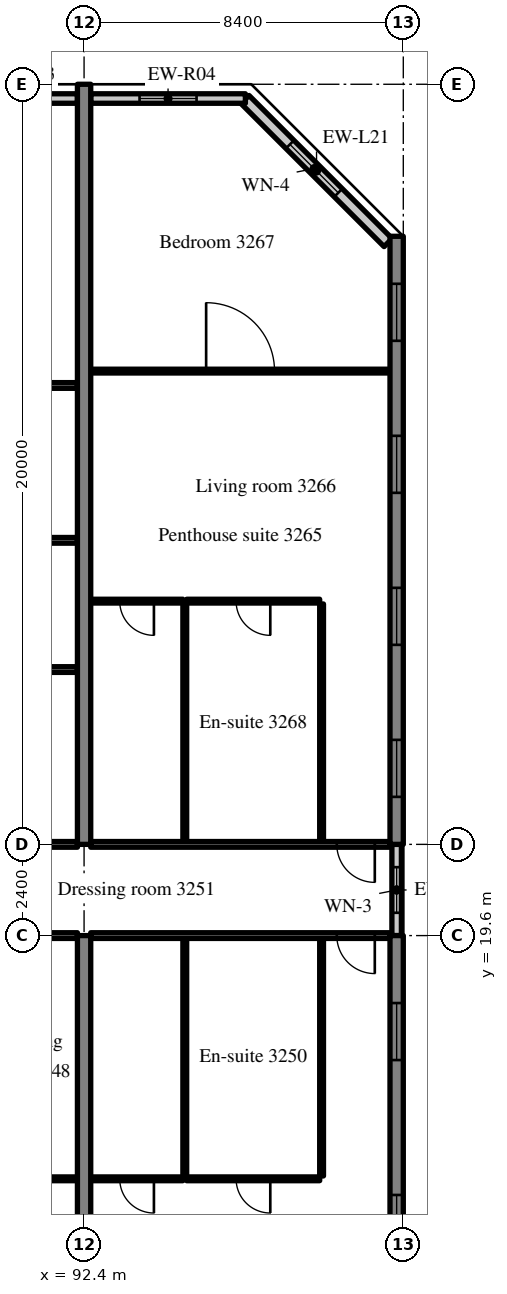
"""IFC4 building model, lengths in metres.
Left out: names, types, materials, properties, quantities, classifications, styles, units other than length and angle.
Written with IfcOpenShell. Run it as: python <this file> out.ifc"""

import sys

from ifc_helpers import new_model, si_unit, direction, frame, frame_2d, origin, place, context, subcontext, project, spatial, rectangle, extrude, source, transform, mapped, element, fill, save


model = new_model("IFC4")
c1 = context("Model", 3, precision=1e-05, world=origin(), true_north=direction((0.0, 1.0)))
c2 = subcontext(c1, "Body", "Model", "MODEL_VIEW")
j1 = project(units=[si_unit("LENGTHUNIT", "METRE"), si_unit("PLANEANGLEUNIT", "RADIAN")], contexts=[c1])
p1 = place(None, origin())
s1 = spatial("IfcSite", under=j1, at=p1, CompositionType="ELEMENT")
p2 = place(p1, origin())
s2 = spatial("IfcBuilding", under=s1, at=p2, CompositionType="ELEMENT")
p3 = place(p2, frame((0.0, 0.0, 133.2)))
s3 = spatial("IfcBuildingStorey", under=s2, at=p3, CompositionType="ELEMENT", Elevation=133.2)
m1 = source(origin(), c2, "Body", "SweptSolid", [
    extrude(rectangle(XDim=14.1, YDim=0.35, at=frame_2d((7.05, 0.0))), origin(), (0.0, 0.0, 1.0), 3.52),
])
p4 = place(p3, frame((92.4, 5.5, 0.0), z_axis=(0.0, 0.0, 1.0), x_axis=(0.0, 1.0, 0.0)))
e1 = element("IfcWall", 1, at=p4, inside=s3, PredefinedType="SHEAR", context=c2, shape_type="MappedRepresentation", body=[
    mapped(m1, transform((0.0, 0.0, 0.0), scale=1.0)),
])
m2 = source(origin(), c2, "Body", "SweptSolid", [
    extrude(rectangle(XDim=20.0, YDim=0.35, at=frame_2d((10.0, 0.0))), origin(), (0.0, 0.0, 1.0), 3.52),
])
p5 = place(p3, frame((92.4, 22.0, 0.0), z_axis=(0.0, 0.0, 1.0), x_axis=(0.0, 1.0, 0.0)))
e2 = element("IfcWall", 2, at=p5, inside=s3, PredefinedType="SHEAR", context=c2, shape_type="MappedRepresentation", body=[
    mapped(m2, transform((0.0, 0.0, 0.0), scale=1.0)),
])
m3 = source(origin(), c2, "Body", "SweptSolid", [
    extrude(rectangle(XDim=10.1, YDim=0.35, at=frame_2d((5.05, 0.0))), origin(), (0.0, 0.0, 1.0), 3.52),
])
p6 = place(p3, frame((100.625, 9.5, 0.0), z_axis=(0.0, 0.0, 1.0), x_axis=(0.0, 1.0, 0.0)))
e3 = element("IfcWall", 3, at=p6, inside=s3, PredefinedType="SHEAR", context=c2, shape_type="MappedRepresentation", body=[
    mapped(m3, transform((0.0, 0.0, 0.0), scale=1.0)),
])
m4 = source(origin(), c2, "Body", "SweptSolid", [
    extrude(rectangle(XDim=1.5, YDim=1.5, at=frame_2d((0.75, 0.75))), frame((0.0, 0.185, 0.0), z_axis=(0.0, -1.0, 0.0), x_axis=(1.0, 0.0, 0.0)), (0.0, 0.0, 1.0), 0.37),
])
p7 = place(p6, frame((1.775, 0.0, 0.9)))
e4 = element("IfcOpeningElement", 4, at=p7, cuts=e3, PredefinedType="OPENING", context=c2, shape_type="MappedRepresentation", body=[
    mapped(m4, transform((0.0, 0.0, 0.0), scale=1.0)),
])
p8 = place(p6, frame((6.825, 0.0, 0.9)))
e5 = element("IfcOpeningElement", 5, at=p8, cuts=e3, PredefinedType="OPENING", context=c2, shape_type="MappedRepresentation", body=[
    mapped(m4, transform((0.0, 0.0, 0.0), scale=1.0)),
])
m5 = source(origin(), c2, "Body", "SweptSolid", [
    extrude(rectangle(XDim=16.0, YDim=0.35, at=frame_2d((8.0, 0.0))), origin(), (0.0, 0.0, 1.0), 3.52),
])
p9 = place(p3, frame((100.625, 22.0, 0.0), z_axis=(0.0, 0.0, 1.0), x_axis=(0.0, 1.0, 0.0)))
e6 = element("IfcWall", 6, at=p9, inside=s3, PredefinedType="SHEAR", context=c2, shape_type="MappedRepresentation", body=[
    mapped(m5, transform((0.0, 0.0, 0.0), scale=1.0)),
])
p10 = place(p9, frame((1.25, 0.0, 0.9)))
e7 = element("IfcOpeningElement", 7, at=p10, cuts=e6, PredefinedType="OPENING", context=c2, shape_type="MappedRepresentation", body=[
    mapped(m4, transform((0.0, 0.0, 0.0), scale=1.0)),
])
p11 = place(p9, frame((5.25, 0.0, 0.9)))
e8 = element("IfcOpeningElement", 8, at=p11, cuts=e6, PredefinedType="OPENING", context=c2, shape_type="MappedRepresentation", body=[
    mapped(m4, transform((0.0, 0.0, 0.0), scale=1.0)),
])
p12 = place(p9, frame((9.25, 0.0, 0.9)))
e9 = element("IfcOpeningElement", 9, at=p12, cuts=e6, PredefinedType="OPENING", context=c2, shape_type="MappedRepresentation", body=[
    mapped(m4, transform((0.0, 0.0, 0.0), scale=1.0)),
])
p13 = place(p9, frame((13.25, 0.0, 0.9)))
e10 = element("IfcOpeningElement", 10, at=p13, cuts=e6, PredefinedType="OPENING", context=c2, shape_type="MappedRepresentation", body=[
    mapped(m4, transform((0.0, 0.0, 0.0), scale=1.0)),
])
m6 = source(origin(), c2, "Body", "SweptSolid", [
    extrude(rectangle(XDim=5.326, YDim=0.3, at=frame_2d((2.663, 0.0))), origin(), (0.0, 0.0, 1.0), 3.52),
])
p14 = place(p3, frame((100.4, 37.834, 0.0), z_axis=(0.0, 0.0, 1.0), x_axis=(-0.707083859269, 0.707129702361, 0.0)))
e11 = element("IfcWall", 11, at=p14, inside=s3, PredefinedType="SOLIDWALL", context=c2, shape_type="MappedRepresentation", body=[
    mapped(m6, transform((0.0, 0.0, 0.0), scale=1.0)),
])
m7 = source(origin(), c2, "Body", "SweptSolid", [
    extrude(rectangle(XDim=1.8, YDim=1.5, at=frame_2d((0.9, 0.75))), frame((0.0, 0.16, 0.0), z_axis=(0.0, -1.0, 0.0), x_axis=(1.0, 0.0, 0.0)), (0.0, 0.0, 1.0), 0.32),
])
p15 = place(p14, frame((1.854, 0.0, 0.9)))
e12 = element("IfcOpeningElement", 12, at=p15, cuts=e11, PredefinedType="OPENING", context=c2, shape_type="MappedRepresentation", body=[
    mapped(m7, transform((0.0, 0.0, 0.0), scale=1.0)),
])
m8 = source(origin(), c2, "Body", "SweptSolid", [
    extrude(rectangle(XDim=3.675, YDim=0.25, at=frame_2d((1.837, 0.0))), origin(), (0.0, 0.0, 1.0), 2.82),
])
p16 = place(p3, frame((92.225, 41.625, 0.0), z_axis=(0.0, 0.0, 1.0), x_axis=(-1.0, 0.0, 0.0)))
e13 = element("IfcWall", 13, at=p16, inside=s3, PredefinedType="SOLIDWALL", context=c2, shape_type="MappedRepresentation", body=[
    mapped(m8, transform((0.0, 0.0, 0.0), scale=1.0)),
])
m9 = source(origin(), c2, "Body", "SweptSolid", [
    extrude(rectangle(XDim=1.5, YDim=1.5, at=frame_2d((0.75, 0.75))), frame((0.0, 0.135, 0.0), z_axis=(0.0, -1.0, 0.0), x_axis=(1.0, 0.0, 0.0)), (0.0, 0.0, 1.0), 0.27),
])
p17 = place(p16, frame((1.087, 0.0, 0.9)))
e14 = element("IfcOpeningElement", 14, at=p17, cuts=e13, PredefinedType="OPENING", context=c2, shape_type="MappedRepresentation", body=[
    mapped(m9, transform((0.0, 0.0, 0.0), scale=1.0)),
])
m10 = source(origin(), c2, "Body", "SweptSolid", [
    extrude(rectangle(XDim=4.07, YDim=0.25, at=frame_2d((2.035, 0.0))), origin(), (0.0, 0.0, 1.0), 2.82),
])
p18 = place(p3, frame((96.645, 41.625, 0.0), z_axis=(0.0, 0.0, 1.0), x_axis=(-1.0, 0.0, 0.0)))
e15 = element("IfcWall", 15, at=p18, inside=s3, PredefinedType="SOLIDWALL", context=c2, shape_type="MappedRepresentation", body=[
    mapped(m10, transform((0.0, 0.0, 0.0), scale=1.0)),
])
p19 = place(p18, frame((1.285, 0.0, 0.9)))
e16 = element("IfcOpeningElement", 16, at=p19, cuts=e15, PredefinedType="OPENING", context=c2, shape_type="MappedRepresentation", body=[
    mapped(m9, transform((0.0, 0.0, 0.0), scale=1.0)),
])
m11 = source(origin(), c2, "Body", "SweptSolid", [
    extrude(rectangle(XDim=2.4, YDim=0.25, at=frame_2d((1.2, 0.0))), origin(), (0.0, 0.0, 1.0), 2.62),
])
p20 = place(p3, frame((100.625, 19.6, 0.0), z_axis=(0.0, 0.0, 1.0), x_axis=(0.0, 1.0, 0.0)))
e17 = element("IfcWall", 17, at=p20, inside=s3, PredefinedType="SOLIDWALL", context=c2, shape_type="MappedRepresentation", body=[
    mapped(m11, transform((0.0, 0.0, 0.0), scale=1.0)),
])
m12 = source(origin(), c2, "Body", "SweptSolid", [
    extrude(rectangle(XDim=1.2, YDim=1.5, at=frame_2d((0.6, 0.75))), frame((0.0, 0.135, 0.0), z_axis=(0.0, -1.0, 0.0), x_axis=(1.0, 0.0, 0.0)), (0.0, 0.0, 1.0), 0.27),
])
p21 = place(p20, frame((0.6, 0.0, 0.9)))
e18 = element("IfcOpeningElement", 18, at=p21, cuts=e17, PredefinedType="OPENING", context=c2, shape_type="MappedRepresentation", body=[
    mapped(m12, transform((0.0, 0.0, 0.0), scale=1.0)),
])
m13 = source(origin(), c2, "Body", "SweptSolid", [
    extrude(rectangle(XDim=2.6, YDim=0.1, at=frame_2d((1.3, 0.0))), origin(), (0.0, 0.0, 1.0), 3.52),
])
p22 = place(p3, frame((89.625, 13.2, 0.0), z_axis=(0.0, 0.0, 1.0), x_axis=(1.0, 0.0, 0.0)))
e19 = element("IfcWall", 19, at=p22, inside=s3, PredefinedType="PARTITIONING", context=c2, shape_type="MappedRepresentation", body=[
    mapped(m13, transform((0.0, 0.0, 0.0), scale=1.0)),
])
m14 = source(origin(), c2, "Body", "SweptSolid", [
    extrude(rectangle(XDim=0.9, YDim=2.1, at=frame_2d((0.45, 1.05))), frame((0.0, 0.06, 0.0), z_axis=(0.0, -1.0, 0.0), x_axis=(1.0, 0.0, 0.0)), (0.0, 0.0, 1.0), 0.12),
])
p23 = place(p22, frame((0.85, 0.0, 0.0)))
e20 = element("IfcOpeningElement", 20, at=p23, cuts=e19, PredefinedType="OPENING", context=c2, shape_type="MappedRepresentation", body=[
    mapped(m14, transform((0.0, 0.0, 0.0), scale=1.0)),
])
m15 = source(origin(), c2, "Body", "SweptSolid", [
    extrude(rectangle(XDim=8.05, YDim=0.15, at=frame_2d((4.025, 0.0))), origin(), (0.0, 0.0, 1.0), 2.82),
])
p24 = place(p3, frame((84.175, 19.6, 0.0), z_axis=(0.0, 0.0, 1.0), x_axis=(1.0, 0.0, 0.0)))
e21 = element("IfcWall", 21, at=p24, inside=s3, PredefinedType="PARTITIONING", context=c2, shape_type="MappedRepresentation", body=[
    mapped(m15, transform((0.0, 0.0, 0.0), scale=1.0)),
])
m16 = source(origin(), c2, "Body", "SweptSolid", [
    extrude(rectangle(XDim=1.0, YDim=2.1, at=frame_2d((0.5, 1.05))), frame((0.0, 0.085, 0.0), z_axis=(0.0, -1.0, 0.0), x_axis=(1.0, 0.0, 0.0)), (0.0, 0.0, 1.0), 0.17),
])
p25 = place(p24, frame((0.4, 0.0, 0.0)))
e22 = element("IfcOpeningElement", 22, at=p25, cuts=e21, PredefinedType="OPENING", context=c2, shape_type="MappedRepresentation", body=[
    mapped(m16, transform((0.0, 0.0, 0.0), scale=1.0)),
])
m17 = source(origin(), c2, "Body", "SweptSolid", [
    extrude(rectangle(XDim=6.25, YDim=0.1, at=frame_2d((3.125, 0.0))), origin(), (0.0, 0.0, 1.0), 3.52),
])
for number, where, z_axis, x_axis in (
    (23, (98.65, 13.275, 0.0), (0.0, 0.0, 1.0), (0.0, 1.0, 0.0)),
    (24, (95.05, 13.275, 0.0), (0.0, 0.0, 1.0), (0.0, 1.0, 0.0)),
):
    element("IfcWall", number, at=place(p3, frame(where, z_axis=z_axis, x_axis=x_axis)), inside=s3, PredefinedType="PARTITIONING", context=c2, shape_type="MappedRepresentation", body=[
        mapped(m17, transform((0.0, 0.0, 0.0), scale=1.0)),
    ])
m18 = source(origin(), c2, "Body", "SweptSolid", [
    extrude(rectangle(XDim=3.5, YDim=0.1, at=frame_2d((1.75, 0.0))), origin(), (0.0, 0.0, 1.0), 3.52),
])
p26 = place(p3, frame((95.1, 13.2, 0.0), z_axis=(0.0, 0.0, 1.0), x_axis=(1.0, 0.0, 0.0)))
e25 = element("IfcWall", 25, at=p26, inside=s3, PredefinedType="PARTITIONING", context=c2, shape_type="MappedRepresentation", body=[
    mapped(m18, transform((0.0, 0.0, 0.0), scale=1.0)),
])
p27 = place(p26, frame((1.3, 0.0, 0.0)))
e26 = element("IfcOpeningElement", 26, at=p27, cuts=e25, PredefinedType="OPENING", context=c2, shape_type="MappedRepresentation", body=[
    mapped(m14, transform((0.0, 0.0, 0.0), scale=1.0)),
])
m19 = source(origin(), c2, "Body", "SweptSolid", [
    extrude(rectangle(XDim=2.425, YDim=0.1, at=frame_2d((1.212, 0.0))), origin(), (0.0, 0.0, 1.0), 3.52),
])
p28 = place(p3, frame((92.575, 13.2, 0.0), z_axis=(0.0, 0.0, 1.0), x_axis=(1.0, 0.0, 0.0)))
e27 = element("IfcWall", 27, at=p28, inside=s3, PredefinedType="PARTITIONING", context=c2, shape_type="MappedRepresentation", body=[
    mapped(m19, transform((0.0, 0.0, 0.0), scale=1.0)),
])
p29 = place(p28, frame((0.763, 0.0, 0.0)))
e28 = element("IfcOpeningElement", 28, at=p29, cuts=e27, PredefinedType="OPENING", context=c2, shape_type="MappedRepresentation", body=[
    mapped(m14, transform((0.0, 0.0, 0.0), scale=1.0)),
])
m20 = source(origin(), c2, "Body", "SweptSolid", [
    extrude(rectangle(XDim=7.875, YDim=0.15, at=frame_2d((3.938, 0.0))), origin(), (0.0, 0.0, 1.0), 2.82),
])
p30 = place(p3, frame((92.575, 19.6, 0.0), z_axis=(0.0, 0.0, 1.0), x_axis=(1.0, 0.0, 0.0)))
e29 = element("IfcWall", 29, at=p30, inside=s3, PredefinedType="PARTITIONING", context=c2, shape_type="MappedRepresentation", body=[
    mapped(m20, transform((0.0, 0.0, 0.0), scale=1.0)),
])
p31 = place(p30, frame((6.475, 0.0, 0.0)))
e30 = element("IfcOpeningElement", 30, at=p31, cuts=e29, PredefinedType="OPENING", context=c2, shape_type="MappedRepresentation", body=[
    mapped(m16, transform((0.0, 0.0, 0.0), scale=1.0)),
])
m21 = source(origin(), c2, "Body", "SweptSolid", [
    extrude(rectangle(XDim=5.5, YDim=0.15, at=frame_2d((2.75, 0.0))), origin(), (0.0, 0.0, 1.0), 2.82),
])
p32 = place(p3, frame((86.725, 22.0, 0.0), z_axis=(0.0, 0.0, 1.0), x_axis=(1.0, 0.0, 0.0)))
e31 = element("IfcWall", 31, at=p32, inside=s3, PredefinedType="PARTITIONING", context=c2, shape_type="MappedRepresentation", body=[
    mapped(m21, transform((0.0, 0.0, 0.0), scale=1.0)),
])
m22 = source(origin(), c2, "Body", "SweptSolid", [
    extrude(rectangle(XDim=5.5, YDim=0.15, at=frame_2d((2.75, 0.0))), origin(), (0.0, 0.0, 1.0), 3.52),
])
for number, where, z_axis, x_axis in (
    (32, (86.725, 26.6, 0.0), (0.0, 0.0, 1.0), (1.0, 0.0, 0.0)),
    (33, (86.725, 30.0, 0.0), (0.0, 0.0, 1.0), (1.0, 0.0, 0.0)),
):
    element("IfcWall", number, at=place(p3, frame(where, z_axis=z_axis, x_axis=x_axis)), inside=s3, PredefinedType="PARTITIONING", context=c2, shape_type="MappedRepresentation", body=[
        mapped(m22, transform((0.0, 0.0, 0.0), scale=1.0)),
    ])
m23 = source(origin(), c2, "Body", "SweptSolid", [
    extrude(rectangle(XDim=8.05, YDim=0.15, at=frame_2d((4.025, 0.0))), origin(), (0.0, 0.0, 1.0), 3.52),
])
p33 = place(p3, frame((84.175, 34.075, 0.0), z_axis=(0.0, 0.0, 1.0), x_axis=(1.0, 0.0, 0.0)))
e34 = element("IfcWall", 34, at=p33, inside=s3, PredefinedType="PARTITIONING", context=c2, shape_type="MappedRepresentation", body=[
    mapped(m23, transform((0.0, 0.0, 0.0), scale=1.0)),
])
p34 = place(p33, frame((0.7, 0.0, 0.0)))
e35 = element("IfcOpeningElement", 35, at=p34, cuts=e34, PredefinedType="OPENING", context=c2, shape_type="MappedRepresentation", body=[
    mapped(m16, transform((0.0, 0.0, 0.0), scale=1.0)),
])
for number, where, z_axis, x_axis in (
    (36, (98.65, 22.075, 0.0), (0.0, 0.0, 1.0), (0.0, 1.0, 0.0)),
    (37, (95.05, 22.075, 0.0), (0.0, 0.0, 1.0), (0.0, 1.0, 0.0)),
):
    element("IfcWall", number, at=place(p3, frame(where, z_axis=z_axis, x_axis=x_axis)), inside=s3, PredefinedType="PARTITIONING", context=c2, shape_type="MappedRepresentation", body=[
        mapped(m17, transform((0.0, 0.0, 0.0), scale=1.0)),
    ])
p35 = place(p3, frame((95.1, 28.4, 0.0), z_axis=(0.0, 0.0, 1.0), x_axis=(1.0, 0.0, 0.0)))
e38 = element("IfcWall", 38, at=p35, inside=s3, PredefinedType="PARTITIONING", context=c2, shape_type="MappedRepresentation", body=[
    mapped(m18, transform((0.0, 0.0, 0.0), scale=1.0)),
])
p36 = place(p35, frame((1.3, 0.0, 0.0)))
e39 = element("IfcOpeningElement", 39, at=p36, cuts=e38, PredefinedType="OPENING", context=c2, shape_type="MappedRepresentation", body=[
    mapped(m14, transform((0.0, 0.0, 0.0), scale=1.0)),
])
p37 = place(p3, frame((92.575, 28.4, 0.0), z_axis=(0.0, 0.0, 1.0), x_axis=(1.0, 0.0, 0.0)))
e40 = element("IfcWall", 40, at=p37, inside=s3, PredefinedType="PARTITIONING", context=c2, shape_type="MappedRepresentation", body=[
    mapped(m19, transform((0.0, 0.0, 0.0), scale=1.0)),
])
p38 = place(p37, frame((0.763, 0.0, 0.0)))
e41 = element("IfcOpeningElement", 41, at=p38, cuts=e40, PredefinedType="OPENING", context=c2, shape_type="MappedRepresentation", body=[
    mapped(m14, transform((0.0, 0.0, 0.0), scale=1.0)),
])
m24 = source(origin(), c2, "Body", "SweptSolid", [
    extrude(rectangle(XDim=7.875, YDim=0.1, at=frame_2d((3.938, 0.0))), origin(), (0.0, 0.0, 1.0), 3.52),
])
p39 = place(p3, frame((92.575, 34.453, 0.0), z_axis=(0.0, 0.0, 1.0), x_axis=(1.0, 0.0, 0.0)))
e42 = element("IfcWall", 42, at=p39, inside=s3, PredefinedType="PARTITIONING", context=c2, shape_type="MappedRepresentation", body=[
    mapped(m24, transform((0.0, 0.0, 0.0), scale=1.0)),
])
m25 = source(origin(), c2, "Body", "SweptSolid", [
    extrude(rectangle(XDim=1.8, YDim=2.1, at=frame_2d((0.9, 1.05))), frame((0.0, 0.06, 0.0), z_axis=(0.0, -1.0, 0.0), x_axis=(1.0, 0.0, 0.0)), (0.0, 0.0, 1.0), 0.12),
])
p40 = place(p39, frame((3.037, 0.0, 0.0)))
e43 = element("IfcOpeningElement", 43, at=p40, cuts=e42, PredefinedType="OPENING", context=c2, shape_type="MappedRepresentation", body=[
    mapped(m25, transform((0.0, 0.0, 0.0), scale=1.0)),
])
p41 = place(p3, frame((92.575, 22.0, 0.0), z_axis=(0.0, 0.0, 1.0), x_axis=(1.0, 0.0, 0.0)))
e44 = element("IfcWall", 44, at=p41, inside=s3, PredefinedType="PARTITIONING", context=c2, shape_type="MappedRepresentation", body=[
    mapped(m20, transform((0.0, 0.0, 0.0), scale=1.0)),
])
p42 = place(p41, frame((6.475, 0.0, 0.0)))
e45 = element("IfcOpeningElement", 45, at=p42, cuts=e44, PredefinedType="OPENING", context=c2, shape_type="MappedRepresentation", body=[
    mapped(m16, transform((0.0, 0.0, 0.0), scale=1.0)),
])
m26 = source(origin(), c2, "Body", "SweptSolid", [
    extrude(rectangle(XDim=1.8, YDim=1.5, at=frame_2d((0.9, 0.75))), frame((0.0, 0.03, 0.0), z_axis=(0.0, -1.0, 0.0), x_axis=(1.0, 0.0, 0.0)), (0.0, 0.0, 1.0), 0.06),
])
p43 = place(p15, origin())
e46 = element("IfcWindow", 46, at=p43, inside=s3, PartitioningType="SINGLE_PANEL", PredefinedType="WINDOW", context=c2, shape_type="MappedRepresentation", body=[
    mapped(m26, transform((0.0, 0.0, 0.0), scale=1.0)),
])
fill(e12, e46)
m27 = source(origin(), c2, "Body", "SweptSolid", [
    extrude(rectangle(XDim=1.5, YDim=1.5, at=frame_2d((0.75, 0.75))), frame((0.0, 0.03, 0.0), z_axis=(0.0, -1.0, 0.0), x_axis=(1.0, 0.0, 0.0)), (0.0, 0.0, 1.0), 0.06),
])
p44 = place(p19, origin())
e47 = element("IfcWindow", 47, at=p44, inside=s3, PartitioningType="SINGLE_PANEL", PredefinedType="WINDOW", context=c2, shape_type="MappedRepresentation", body=[
    mapped(m27, transform((0.0, 0.0, 0.0), scale=1.0)),
])
fill(e16, e47)
p45 = place(p7, origin())
e48 = element("IfcWindow", 48, at=p45, inside=s3, PartitioningType="SINGLE_PANEL", PredefinedType="WINDOW", context=c2, shape_type="MappedRepresentation", body=[
    mapped(m27, transform((0.0, 0.0, 0.0), scale=1.0)),
])
fill(e4, e48)
p46 = place(p8, origin())
e49 = element("IfcWindow", 49, at=p46, inside=s3, PartitioningType="SINGLE_PANEL", PredefinedType="WINDOW", context=c2, shape_type="MappedRepresentation", body=[
    mapped(m27, transform((0.0, 0.0, 0.0), scale=1.0)),
])
fill(e5, e49)
p47 = place(p10, origin())
e50 = element("IfcWindow", 50, at=p47, inside=s3, PartitioningType="SINGLE_PANEL", PredefinedType="WINDOW", context=c2, shape_type="MappedRepresentation", body=[
    mapped(m27, transform((0.0, 0.0, 0.0), scale=1.0)),
])
fill(e7, e50)
p48 = place(p11, origin())
e51 = element("IfcWindow", 51, at=p48, inside=s3, PartitioningType="SINGLE_PANEL", PredefinedType="WINDOW", context=c2, shape_type="MappedRepresentation", body=[
    mapped(m27, transform((0.0, 0.0, 0.0), scale=1.0)),
])
fill(e8, e51)
p49 = place(p12, origin())
e52 = element("IfcWindow", 52, at=p49, inside=s3, PartitioningType="SINGLE_PANEL", PredefinedType="WINDOW", context=c2, shape_type="MappedRepresentation", body=[
    mapped(m27, transform((0.0, 0.0, 0.0), scale=1.0)),
])
fill(e9, e52)
p50 = place(p13, origin())
e53 = element("IfcWindow", 53, at=p50, inside=s3, PartitioningType="SINGLE_PANEL", PredefinedType="WINDOW", context=c2, shape_type="MappedRepresentation", body=[
    mapped(m27, transform((0.0, 0.0, 0.0), scale=1.0)),
])
fill(e10, e53)
m28 = source(origin(), c2, "Body", "SweptSolid", [
    extrude(rectangle(XDim=1.2, YDim=1.5, at=frame_2d((0.6, 0.75))), frame((0.0, 0.03, 0.0), z_axis=(0.0, -1.0, 0.0), x_axis=(1.0, 0.0, 0.0)), (0.0, 0.0, 1.0), 0.06),
])
p51 = place(p21, origin())
e54 = element("IfcWindow", 54, at=p51, inside=s3, PartitioningType="SINGLE_PANEL", PredefinedType="WINDOW", context=c2, shape_type="MappedRepresentation", body=[
    mapped(m28, transform((0.0, 0.0, 0.0), scale=1.0)),
])
fill(e18, e54)
m29 = source(origin(), c2, "Body", "SweptSolid", [
    extrude(rectangle(XDim=0.9, YDim=2.1, at=frame_2d((0.45, 1.05))), frame((0.0, 0.025, 0.0), z_axis=(0.0, -1.0, 0.0), x_axis=(1.0, 0.0, 0.0)), (0.0, 0.0, 1.0), 0.05),
])
p52 = place(p27, origin())
e55 = element("IfcDoor", 55, at=p52, inside=s3, OperationType="SINGLE_SWING_RIGHT", PredefinedType="DOOR", context=c2, shape_type="MappedRepresentation", body=[
    mapped(m29, transform((0.0, 0.0, 0.0), scale=1.0)),
])
fill(e26, e55)
p53 = place(p29, origin())
e56 = element("IfcDoor", 56, at=p53, inside=s3, OperationType="SINGLE_SWING_RIGHT", PredefinedType="DOOR", context=c2, shape_type="MappedRepresentation", body=[
    mapped(m29, transform((0.0, 0.0, 0.0), scale=1.0)),
])
fill(e28, e56)
m30 = source(origin(), c2, "Body", "SweptSolid", [
    extrude(rectangle(XDim=1.0, YDim=2.1, at=frame_2d((0.5, 1.05))), frame((0.0, 0.025, 0.0), z_axis=(0.0, -1.0, 0.0), x_axis=(1.0, 0.0, 0.0)), (0.0, 0.0, 1.0), 0.05),
])
p54 = place(p31, origin())
e57 = element("IfcDoor", 57, at=p54, inside=s3, OperationType="SINGLE_SWING_RIGHT", PredefinedType="DOOR", context=c2, shape_type="MappedRepresentation", body=[
    mapped(m30, transform((0.0, 0.0, 0.0), scale=1.0)),
])
fill(e30, e57)
p55 = place(p36, origin())
e58 = element("IfcDoor", 58, at=p55, inside=s3, OperationType="SINGLE_SWING_RIGHT", PredefinedType="DOOR", context=c2, shape_type="MappedRepresentation", body=[
    mapped(m29, transform((0.0, 0.0, 0.0), scale=1.0)),
])
fill(e39, e58)
p56 = place(p38, origin())
e59 = element("IfcDoor", 59, at=p56, inside=s3, OperationType="SINGLE_SWING_RIGHT", PredefinedType="DOOR", context=c2, shape_type="MappedRepresentation", body=[
    mapped(m29, transform((0.0, 0.0, 0.0), scale=1.0)),
])
fill(e41, e59)
m31 = source(origin(), c2, "Body", "SweptSolid", [
    extrude(rectangle(XDim=1.8, YDim=2.1, at=frame_2d((0.9, 1.05))), frame((0.0, 0.025, 0.0), z_axis=(0.0, -1.0, 0.0), x_axis=(1.0, 0.0, 0.0)), (0.0, 0.0, 1.0), 0.05),
])
p57 = place(p40, origin())
e60 = element("IfcDoor", 60, at=p57, inside=s3, OperationType="DOUBLE_DOOR_SINGLE_SWING", PredefinedType="DOOR", context=c2, shape_type="MappedRepresentation", body=[
    mapped(m31, transform((0.0, 0.0, 0.0), scale=1.0)),
])
fill(e43, e60)
p58 = place(p42, origin())
e61 = element("IfcDoor", 61, at=p58, inside=s3, OperationType="SINGLE_SWING_RIGHT", PredefinedType="DOOR", context=c2, shape_type="MappedRepresentation", body=[
    mapped(m30, transform((0.0, 0.0, 0.0), scale=1.0)),
])
fill(e45, e61)
save(model, sys.argv[1])
